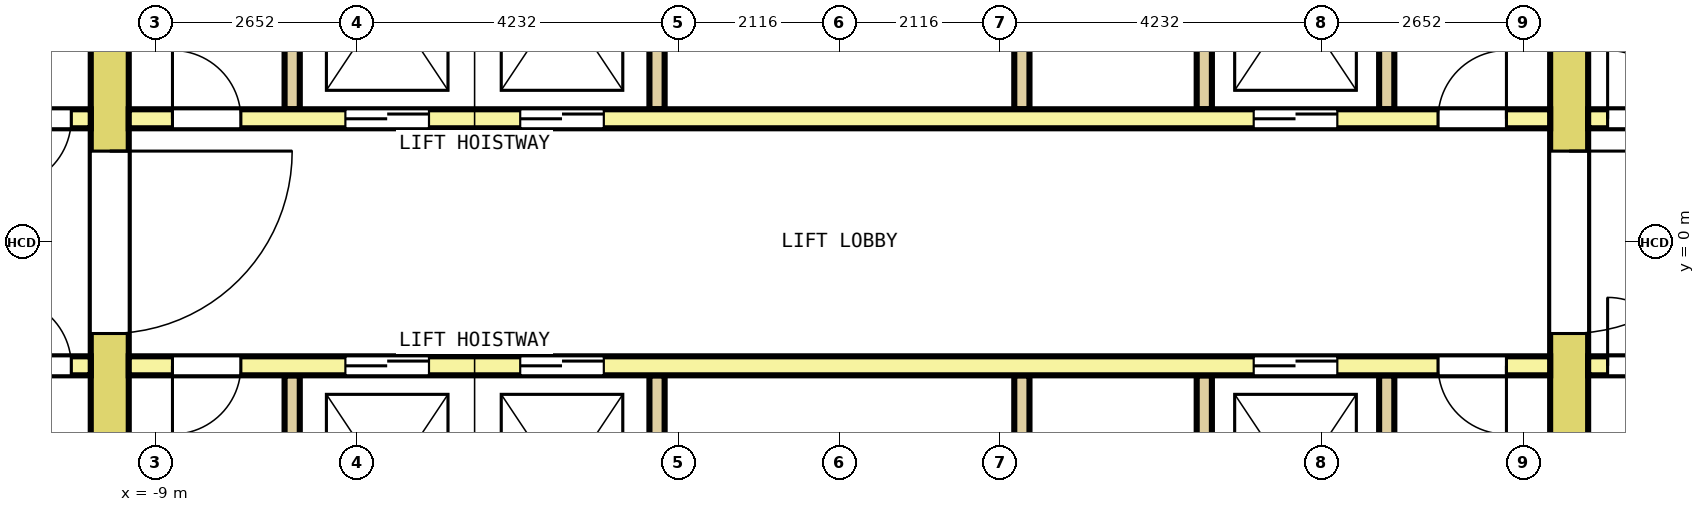
"""IFC4 building model, lengths in metres.
Left out: names, types, materials, properties, quantities, classifications, styles, units other than length and angle.
Written with IfcOpenShell. Run it as: python <this file> out.ifc"""

import sys

from ifc_helpers import new_model, si_unit, direction, frame, frame_2d, origin, place, context, subcontext, project, spatial, rectangle, extrude, element, fill, save


model = new_model("IFC4")
c1 = context("Model", 3, precision=1e-05, world=origin(), true_north=direction((0.0, 1.0)))
c2 = subcontext(c1, "Body", "Model", "MODEL_VIEW")
j1 = project(units=[si_unit("LENGTHUNIT", "METRE"), si_unit("PLANEANGLEUNIT", "RADIAN")], contexts=[c1])
p1 = place(None, origin())
s1 = spatial("IfcSite", under=j1, at=p1, CompositionType="ELEMENT")
p2 = place(p1, origin())
s2 = spatial("IfcBuilding", under=s1, at=p2, CompositionType="ELEMENT")
p3 = place(p2, frame((0.0, 0.0, 113.2)))
s3 = spatial("IfcBuildingStorey", under=s2, at=p3, CompositionType="ELEMENT", Elevation=113.2)
p4 = place(p3, frame((-9.6, -7.7, 0.0), z_axis=(0.0, 0.0, 1.0), x_axis=(0.0, 1.0, 0.0)))
e1 = element("IfcWall", 1, at=p4, inside=s3, PredefinedType="SHEAR", context=c2, shape_type="SweptSolid", body=[
    extrude(rectangle(XDim=15.4, YDim=0.5, at=frame_2d((7.7, 0.0))), origin(), (0.0, 0.0, 1.0), 4.1),
])
p5 = place(p4, frame((6.5, 0.0, 0.0)))
e2 = element("IfcOpeningElement", 2, at=p5, cuts=e1, PredefinedType="OPENING", context=c2, shape_type="SweptSolid", body=[
    extrude(rectangle(XDim=2.4, YDim=2.1, at=frame_2d((1.2, 1.05))), frame((0.0, 0.26, 0.0), z_axis=(0.0, -1.0, 0.0), x_axis=(1.0, 0.0, 0.0)), (0.0, 0.0, 1.0), 0.52),
])
p6 = place(p4, frame((13.4, 0.0, 0.0)))
e3 = element("IfcOpeningElement", 3, at=p6, cuts=e1, PredefinedType="OPENING", context=c2, shape_type="SweptSolid", body=[
    extrude(rectangle(XDim=1.2, YDim=2.1, at=frame_2d((0.6, 1.05))), frame((0.0, 0.26, 0.0), z_axis=(0.0, -1.0, 0.0), x_axis=(1.0, 0.0, 0.0)), (0.0, 0.0, 1.0), 0.52),
])
p7 = place(p4, frame((0.8, 0.0, 0.0)))
e4 = element("IfcOpeningElement", 4, at=p7, cuts=e1, PredefinedType="OPENING", context=c2, shape_type="SweptSolid", body=[
    extrude(rectangle(XDim=1.2, YDim=2.1, at=frame_2d((0.6, 1.05))), frame((0.0, 0.26, 0.0), z_axis=(0.0, -1.0, 0.0), x_axis=(1.0, 0.0, 0.0)), (0.0, 0.0, 1.0), 0.52),
])
p8 = place(p3, frame((9.6, -7.7, 0.0), z_axis=(0.0, 0.0, 1.0), x_axis=(0.0, 1.0, 0.0)))
e5 = element("IfcWall", 5, at=p8, inside=s3, PredefinedType="SHEAR", context=c2, shape_type="SweptSolid", body=[
    extrude(rectangle(XDim=15.4, YDim=0.5, at=frame_2d((7.7, 0.0))), origin(), (0.0, 0.0, 1.0), 4.1),
])
p9 = place(p8, frame((6.5, 0.0, 0.0)))
e6 = element("IfcOpeningElement", 6, at=p9, cuts=e5, PredefinedType="OPENING", context=c2, shape_type="SweptSolid", body=[
    extrude(rectangle(XDim=2.4, YDim=2.1, at=frame_2d((1.2, 1.05))), frame((0.0, 0.26, 0.0), z_axis=(0.0, -1.0, 0.0), x_axis=(1.0, 0.0, 0.0)), (0.0, 0.0, 1.0), 0.52),
])
p10 = place(p8, frame((13.4, 0.0, 0.0)))
e7 = element("IfcOpeningElement", 7, at=p10, cuts=e5, PredefinedType="OPENING", context=c2, shape_type="SweptSolid", body=[
    extrude(rectangle(XDim=1.2, YDim=2.1, at=frame_2d((0.6, 1.05))), frame((0.0, 0.26, 0.0), z_axis=(0.0, -1.0, 0.0), x_axis=(1.0, 0.0, 0.0)), (0.0, 0.0, 1.0), 0.52),
])
p11 = place(p8, frame((0.9, 0.0, 0.0)))
e8 = element("IfcOpeningElement", 8, at=p11, cuts=e5, PredefinedType="OPENING", context=c2, shape_type="SweptSolid", body=[
    extrude(rectangle(XDim=1.0, YDim=2.1, at=frame_2d((0.5, 1.05))), frame((0.0, 0.26, 0.0), z_axis=(0.0, -1.0, 0.0), x_axis=(1.0, 0.0, 0.0)), (0.0, 0.0, 1.0), 0.52),
])
p12 = place(p3, frame((-12.8, 1.625, 0.0), z_axis=(0.0, 0.0, 1.0), x_axis=(1.0, 0.0, 0.0)))
e9 = element("IfcWall", 9, at=p12, inside=s3, PredefinedType="SOLIDWALL", context=c2, shape_type="SweptSolid", body=[
    extrude(rectangle(XDim=2.95, YDim=0.25, at=frame_2d((1.475, 0.0))), origin(), (0.0, 0.0, 1.0), 4.1),
])
p13 = place(p12, frame((0.256, 0.0, 0.0)))
e10 = element("IfcOpeningElement", 10, at=p13, cuts=e9, PredefinedType="OPENING", context=c2, shape_type="SweptSolid", body=[
    extrude(rectangle(XDim=0.9, YDim=2.1, at=frame_2d((0.45, 1.05))), frame((0.0, 0.135, 0.0), z_axis=(0.0, -1.0, 0.0), x_axis=(1.0, 0.0, 0.0)), (0.0, 0.0, 1.0), 0.27),
])
p14 = place(p12, frame((1.794, 0.0, 0.0)))
e11 = element("IfcOpeningElement", 11, at=p14, cuts=e9, PredefinedType="OPENING", context=c2, shape_type="SweptSolid", body=[
    extrude(rectangle(XDim=0.9, YDim=2.1, at=frame_2d((0.45, 1.05))), frame((0.0, 0.135, 0.0), z_axis=(0.0, -1.0, 0.0), x_axis=(1.0, 0.0, 0.0)), (0.0, 0.0, 1.0), 0.27),
])
p15 = place(p3, frame((-9.35, 1.625, 0.0), z_axis=(0.0, 0.0, 1.0), x_axis=(1.0, 0.0, 0.0)))
e12 = element("IfcWall", 12, at=p15, inside=s3, PredefinedType="SOLIDWALL", context=c2, shape_type="SweptSolid", body=[
    extrude(rectangle(XDim=18.7, YDim=0.25, at=frame_2d((9.35, 0.0))), origin(), (0.0, 0.0, 1.0), 4.1),
])
p16 = place(p15, frame((2.85, 0.0, 0.0)))
e13 = element("IfcOpeningElement", 13, at=p16, cuts=e12, PredefinedType="OPENING", context=c2, shape_type="SweptSolid", body=[
    extrude(rectangle(XDim=1.1, YDim=2.1, at=frame_2d((0.55, 1.05))), frame((0.0, 0.135, 0.0), z_axis=(0.0, -1.0, 0.0), x_axis=(1.0, 0.0, 0.0)), (0.0, 0.0, 1.0), 0.27),
])
p17 = place(p15, frame((5.15, 0.0, 0.0)))
e14 = element("IfcOpeningElement", 14, at=p17, cuts=e12, PredefinedType="OPENING", context=c2, shape_type="SweptSolid", body=[
    extrude(rectangle(XDim=1.1, YDim=2.1, at=frame_2d((0.55, 1.05))), frame((0.0, 0.135, 0.0), z_axis=(0.0, -1.0, 0.0), x_axis=(1.0, 0.0, 0.0)), (0.0, 0.0, 1.0), 0.27),
])
p18 = place(p15, frame((14.8, 0.0, 0.0)))
e15 = element("IfcOpeningElement", 15, at=p18, cuts=e12, PredefinedType="OPENING", context=c2, shape_type="SweptSolid", body=[
    extrude(rectangle(XDim=1.1, YDim=2.1, at=frame_2d((0.55, 1.05))), frame((0.0, 0.135, 0.0), z_axis=(0.0, -1.0, 0.0), x_axis=(1.0, 0.0, 0.0)), (0.0, 0.0, 1.0), 0.27),
])
p19 = place(p15, frame((0.575, 0.0, 0.0)))
e16 = element("IfcOpeningElement", 16, at=p19, cuts=e12, PredefinedType="OPENING", context=c2, shape_type="SweptSolid", body=[
    extrude(rectangle(XDim=0.9, YDim=2.1, at=frame_2d((0.45, 1.05))), frame((0.0, 0.135, 0.0), z_axis=(0.0, -1.0, 0.0), x_axis=(1.0, 0.0, 0.0)), (0.0, 0.0, 1.0), 0.27),
])
p20 = place(p15, frame((17.225, 0.0, 0.0)))
e17 = element("IfcOpeningElement", 17, at=p20, cuts=e12, PredefinedType="OPENING", context=c2, shape_type="SweptSolid", body=[
    extrude(rectangle(XDim=0.9, YDim=2.1, at=frame_2d((0.45, 1.05))), frame((0.0, 0.135, 0.0), z_axis=(0.0, -1.0, 0.0), x_axis=(1.0, 0.0, 0.0)), (0.0, 0.0, 1.0), 0.27),
])
p21 = place(p3, frame((9.85, 1.625, 0.0), z_axis=(0.0, 0.0, 1.0), x_axis=(1.0, 0.0, 0.0)))
e18 = element("IfcWall", 18, at=p21, inside=s3, PredefinedType="SOLIDWALL", context=c2, shape_type="SweptSolid", body=[
    extrude(rectangle(XDim=2.95, YDim=0.25, at=frame_2d((1.475, 0.0))), origin(), (0.0, 0.0, 1.0), 4.1),
])
p22 = place(p21, frame((0.256, 0.0, 0.0)))
e19 = element("IfcOpeningElement", 19, at=p22, cuts=e18, PredefinedType="OPENING", context=c2, shape_type="SweptSolid", body=[
    extrude(rectangle(XDim=0.9, YDim=2.1, at=frame_2d((0.45, 1.05))), frame((0.0, 0.135, 0.0), z_axis=(0.0, -1.0, 0.0), x_axis=(1.0, 0.0, 0.0)), (0.0, 0.0, 1.0), 0.27),
])
p23 = place(p21, frame((1.794, 0.0, 0.0)))
e20 = element("IfcOpeningElement", 20, at=p23, cuts=e18, PredefinedType="OPENING", context=c2, shape_type="SweptSolid", body=[
    extrude(rectangle(XDim=0.9, YDim=2.1, at=frame_2d((0.45, 1.05))), frame((0.0, 0.135, 0.0), z_axis=(0.0, -1.0, 0.0), x_axis=(1.0, 0.0, 0.0)), (0.0, 0.0, 1.0), 0.27),
])
for number, where, z_axis, x_axis in (
    (21, (-7.2, 1.75, 0.0), (0.0, 0.0, 1.0), (0.0, 1.0, 0.0)),
    (22, (-2.4, 1.75, 0.0), (0.0, 0.0, 1.0), (0.0, 1.0, 0.0)),
    (23, (2.4, 1.75, 0.0), (0.0, 0.0, 1.0), (0.0, 1.0, 0.0)),
    (24, (4.8, 1.75, 0.0), (0.0, 0.0, 1.0), (0.0, 1.0, 0.0)),
    (25, (7.2, 1.75, 0.0), (0.0, 0.0, 1.0), (0.0, 1.0, 0.0)),
):
    element("IfcWall", number, at=place(p3, frame(where, z_axis=z_axis, x_axis=x_axis)), inside=s3, PredefinedType="SOLIDWALL", context=c2, shape_type="SweptSolid", body=[
        extrude(rectangle(XDim=2.9, YDim=0.2, at=frame_2d((1.45, 0.0))), origin(), (0.0, 0.0, 1.0), 4.1),
    ])
p24 = place(p3, frame((-12.8, -1.625, 0.0), z_axis=(0.0, 0.0, 1.0), x_axis=(1.0, 0.0, 0.0)))
e26 = element("IfcWall", 26, at=p24, inside=s3, PredefinedType="SOLIDWALL", context=c2, shape_type="SweptSolid", body=[
    extrude(rectangle(XDim=2.95, YDim=0.25, at=frame_2d((1.475, 0.0))), origin(), (0.0, 0.0, 1.0), 4.1),
])
p25 = place(p24, frame((0.256, 0.0, 0.0)))
e27 = element("IfcOpeningElement", 27, at=p25, cuts=e26, PredefinedType="OPENING", context=c2, shape_type="SweptSolid", body=[
    extrude(rectangle(XDim=0.9, YDim=2.1, at=frame_2d((0.45, 1.05))), frame((0.0, 0.135, 0.0), z_axis=(0.0, -1.0, 0.0), x_axis=(1.0, 0.0, 0.0)), (0.0, 0.0, 1.0), 0.27),
])
p26 = place(p24, frame((1.794, 0.0, 0.0)))
e28 = element("IfcOpeningElement", 28, at=p26, cuts=e26, PredefinedType="OPENING", context=c2, shape_type="SweptSolid", body=[
    extrude(rectangle(XDim=0.9, YDim=2.1, at=frame_2d((0.45, 1.05))), frame((0.0, 0.135, 0.0), z_axis=(0.0, -1.0, 0.0), x_axis=(1.0, 0.0, 0.0)), (0.0, 0.0, 1.0), 0.27),
])
p27 = place(p3, frame((-9.35, -1.625, 0.0), z_axis=(0.0, 0.0, 1.0), x_axis=(1.0, 0.0, 0.0)))
e29 = element("IfcWall", 29, at=p27, inside=s3, PredefinedType="SOLIDWALL", context=c2, shape_type="SweptSolid", body=[
    extrude(rectangle(XDim=18.7, YDim=0.25, at=frame_2d((9.35, 0.0))), origin(), (0.0, 0.0, 1.0), 4.1),
])
p28 = place(p27, frame((2.85, 0.0, 0.0)))
e30 = element("IfcOpeningElement", 30, at=p28, cuts=e29, PredefinedType="OPENING", context=c2, shape_type="SweptSolid", body=[
    extrude(rectangle(XDim=1.1, YDim=2.1, at=frame_2d((0.55, 1.05))), frame((0.0, 0.135, 0.0), z_axis=(0.0, -1.0, 0.0), x_axis=(1.0, 0.0, 0.0)), (0.0, 0.0, 1.0), 0.27),
])
p29 = place(p27, frame((5.15, 0.0, 0.0)))
e31 = element("IfcOpeningElement", 31, at=p29, cuts=e29, PredefinedType="OPENING", context=c2, shape_type="SweptSolid", body=[
    extrude(rectangle(XDim=1.1, YDim=2.1, at=frame_2d((0.55, 1.05))), frame((0.0, 0.135, 0.0), z_axis=(0.0, -1.0, 0.0), x_axis=(1.0, 0.0, 0.0)), (0.0, 0.0, 1.0), 0.27),
])
p30 = place(p27, frame((14.8, 0.0, 0.0)))
e32 = element("IfcOpeningElement", 32, at=p30, cuts=e29, PredefinedType="OPENING", context=c2, shape_type="SweptSolid", body=[
    extrude(rectangle(XDim=1.1, YDim=2.1, at=frame_2d((0.55, 1.05))), frame((0.0, 0.135, 0.0), z_axis=(0.0, -1.0, 0.0), x_axis=(1.0, 0.0, 0.0)), (0.0, 0.0, 1.0), 0.27),
])
p31 = place(p27, frame((0.575, 0.0, 0.0)))
e33 = element("IfcOpeningElement", 33, at=p31, cuts=e29, PredefinedType="OPENING", context=c2, shape_type="SweptSolid", body=[
    extrude(rectangle(XDim=0.9, YDim=2.1, at=frame_2d((0.45, 1.05))), frame((0.0, 0.135, 0.0), z_axis=(0.0, -1.0, 0.0), x_axis=(1.0, 0.0, 0.0)), (0.0, 0.0, 1.0), 0.27),
])
p32 = place(p27, frame((17.225, 0.0, 0.0)))
e34 = element("IfcOpeningElement", 34, at=p32, cuts=e29, PredefinedType="OPENING", context=c2, shape_type="SweptSolid", body=[
    extrude(rectangle(XDim=0.9, YDim=2.1, at=frame_2d((0.45, 1.05))), frame((0.0, 0.135, 0.0), z_axis=(0.0, -1.0, 0.0), x_axis=(1.0, 0.0, 0.0)), (0.0, 0.0, 1.0), 0.27),
])
p33 = place(p3, frame((9.85, -1.625, 0.0), z_axis=(0.0, 0.0, 1.0), x_axis=(1.0, 0.0, 0.0)))
e35 = element("IfcWall", 35, at=p33, inside=s3, PredefinedType="SOLIDWALL", context=c2, shape_type="SweptSolid", body=[
    extrude(rectangle(XDim=2.95, YDim=0.25, at=frame_2d((1.475, 0.0))), origin(), (0.0, 0.0, 1.0), 4.1),
])
p34 = place(p33, frame((0.256, 0.0, 0.0)))
e36 = element("IfcOpeningElement", 36, at=p34, cuts=e35, PredefinedType="OPENING", context=c2, shape_type="SweptSolid", body=[
    extrude(rectangle(XDim=0.9, YDim=2.1, at=frame_2d((0.45, 1.05))), frame((0.0, 0.135, 0.0), z_axis=(0.0, -1.0, 0.0), x_axis=(1.0, 0.0, 0.0)), (0.0, 0.0, 1.0), 0.27),
])
p35 = place(p33, frame((1.794, 0.0, 0.0)))
e37 = element("IfcOpeningElement", 37, at=p35, cuts=e35, PredefinedType="OPENING", context=c2, shape_type="SweptSolid", body=[
    extrude(rectangle(XDim=0.9, YDim=2.1, at=frame_2d((0.45, 1.05))), frame((0.0, 0.135, 0.0), z_axis=(0.0, -1.0, 0.0), x_axis=(1.0, 0.0, 0.0)), (0.0, 0.0, 1.0), 0.27),
])
for number, where, z_axis, x_axis in (
    (38, (-7.2, -4.65, 0.0), (0.0, 0.0, 1.0), (0.0, 1.0, 0.0)),
    (39, (-2.4, -4.65, 0.0), (0.0, 0.0, 1.0), (0.0, 1.0, 0.0)),
    (40, (2.4, -4.65, 0.0), (0.0, 0.0, 1.0), (0.0, 1.0, 0.0)),
    (41, (4.8, -4.65, 0.0), (0.0, 0.0, 1.0), (0.0, 1.0, 0.0)),
    (42, (7.2, -4.65, 0.0), (0.0, 0.0, 1.0), (0.0, 1.0, 0.0)),
):
    element("IfcWall", number, at=place(p3, frame(where, z_axis=z_axis, x_axis=x_axis)), inside=s3, PredefinedType="SOLIDWALL", context=c2, shape_type="SweptSolid", body=[
        extrude(rectangle(XDim=2.9, YDim=0.2, at=frame_2d((1.45, 0.0))), origin(), (0.0, 0.0, 1.0), 4.1),
    ])
p36 = place(p16, origin())
e43 = element("IfcDoor", 43, at=p36, inside=s3, OperationType="DOUBLE_DOOR_SLIDING", PredefinedType="DOOR", context=c2, shape_type="SweptSolid", body=[
    extrude(rectangle(XDim=1.1, YDim=2.1, at=frame_2d((0.55, 1.05))), frame((0.0, 0.075, 0.0), z_axis=(0.0, -1.0, 0.0), x_axis=(1.0, 0.0, 0.0)), (0.0, 0.0, 1.0), 0.15),
])
fill(e13, e43)
p37 = place(p17, origin())
e44 = element("IfcDoor", 44, at=p37, inside=s3, OperationType="DOUBLE_DOOR_SLIDING", PredefinedType="DOOR", context=c2, shape_type="SweptSolid", body=[
    extrude(rectangle(XDim=1.1, YDim=2.1, at=frame_2d((0.55, 1.05))), frame((0.0, 0.075, 0.0), z_axis=(0.0, -1.0, 0.0), x_axis=(1.0, 0.0, 0.0)), (0.0, 0.0, 1.0), 0.15),
])
fill(e14, e44)
p38 = place(p18, origin())
e45 = element("IfcDoor", 45, at=p38, inside=s3, OperationType="DOUBLE_DOOR_SLIDING", PredefinedType="DOOR", context=c2, shape_type="SweptSolid", body=[
    extrude(rectangle(XDim=1.1, YDim=2.1, at=frame_2d((0.55, 1.05))), frame((0.0, 0.075, 0.0), z_axis=(0.0, -1.0, 0.0), x_axis=(1.0, 0.0, 0.0)), (0.0, 0.0, 1.0), 0.15),
])
fill(e15, e45)
p39 = place(p28, origin())
e46 = element("IfcDoor", 46, at=p39, inside=s3, OperationType="DOUBLE_DOOR_SLIDING", PredefinedType="DOOR", context=c2, shape_type="SweptSolid", body=[
    extrude(rectangle(XDim=1.1, YDim=2.1, at=frame_2d((0.55, 1.05))), frame((0.0, 0.075, 0.0), z_axis=(0.0, -1.0, 0.0), x_axis=(1.0, 0.0, 0.0)), (0.0, 0.0, 1.0), 0.15),
])
fill(e30, e46)
p40 = place(p29, origin())
e47 = element("IfcDoor", 47, at=p40, inside=s3, OperationType="DOUBLE_DOOR_SLIDING", PredefinedType="DOOR", context=c2, shape_type="SweptSolid", body=[
    extrude(rectangle(XDim=1.1, YDim=2.1, at=frame_2d((0.55, 1.05))), frame((0.0, 0.075, 0.0), z_axis=(0.0, -1.0, 0.0), x_axis=(1.0, 0.0, 0.0)), (0.0, 0.0, 1.0), 0.15),
])
fill(e31, e47)
p41 = place(p30, origin())
e48 = element("IfcDoor", 48, at=p41, inside=s3, OperationType="DOUBLE_DOOR_SLIDING", PredefinedType="DOOR", context=c2, shape_type="SweptSolid", body=[
    extrude(rectangle(XDim=1.1, YDim=2.1, at=frame_2d((0.55, 1.05))), frame((0.0, 0.075, 0.0), z_axis=(0.0, -1.0, 0.0), x_axis=(1.0, 0.0, 0.0)), (0.0, 0.0, 1.0), 0.15),
])
fill(e32, e48)
p42 = place(p5, origin())
e49 = element("IfcDoor", 49, at=p42, inside=s3, OperationType="DOUBLE_DOOR_SINGLE_SWING", PredefinedType="DOOR", context=c2, shape_type="SweptSolid", body=[
    extrude(rectangle(XDim=2.4, YDim=2.1, at=frame_2d((1.2, 1.05))), frame((0.0, 0.2, 0.0), z_axis=(0.0, -1.0, 0.0), x_axis=(1.0, 0.0, 0.0)), (0.0, 0.0, 1.0), 0.4),
])
fill(e2, e49)
p43 = place(p9, origin())
e50 = element("IfcDoor", 50, at=p43, inside=s3, OperationType="DOUBLE_DOOR_SINGLE_SWING", PredefinedType="DOOR", context=c2, shape_type="SweptSolid", body=[
    extrude(rectangle(XDim=2.4, YDim=2.1, at=frame_2d((1.2, 1.05))), frame((0.0, 0.2, 0.0), z_axis=(0.0, -1.0, 0.0), x_axis=(1.0, 0.0, 0.0)), (0.0, 0.0, 1.0), 0.4),
])
fill(e6, e50)
p44 = place(p14, origin())
e51 = element("IfcDoor", 51, at=p44, inside=s3, OperationType="SINGLE_SWING_RIGHT", PredefinedType="DOOR", context=c2, shape_type="SweptSolid", body=[
    extrude(rectangle(XDim=0.9, YDim=2.1, at=frame_2d((0.45, 1.05))), frame((0.0, 0.075, 0.0), z_axis=(0.0, -1.0, 0.0), x_axis=(1.0, 0.0, 0.0)), (0.0, 0.0, 1.0), 0.15),
])
fill(e11, e51)
p45 = place(p19, origin())
e52 = element("IfcDoor", 52, at=p45, inside=s3, OperationType="SINGLE_SWING_LEFT", PredefinedType="DOOR", context=c2, shape_type="SweptSolid", body=[
    extrude(rectangle(XDim=0.9, YDim=2.1, at=frame_2d((0.45, 1.05))), frame((0.0, 0.075, 0.0), z_axis=(0.0, -1.0, 0.0), x_axis=(1.0, 0.0, 0.0)), (0.0, 0.0, 1.0), 0.15),
])
fill(e16, e52)
p46 = place(p20, origin())
e53 = element("IfcDoor", 53, at=p46, inside=s3, OperationType="SINGLE_SWING_RIGHT", PredefinedType="DOOR", context=c2, shape_type="SweptSolid", body=[
    extrude(rectangle(XDim=0.9, YDim=2.1, at=frame_2d((0.45, 1.05))), frame((0.0, 0.075, 0.0), z_axis=(0.0, -1.0, 0.0), x_axis=(1.0, 0.0, 0.0)), (0.0, 0.0, 1.0), 0.15),
])
fill(e17, e53)
p47 = place(p22, origin())
e54 = element("IfcDoor", 54, at=p47, inside=s3, OperationType="SINGLE_SWING_LEFT", PredefinedType="DOOR", context=c2, shape_type="SweptSolid", body=[
    extrude(rectangle(XDim=0.9, YDim=2.1, at=frame_2d((0.45, 1.05))), frame((0.0, 0.075, 0.0), z_axis=(0.0, -1.0, 0.0), x_axis=(1.0, 0.0, 0.0)), (0.0, 0.0, 1.0), 0.15),
])
fill(e19, e54)
p48 = place(p26, origin())
e55 = element("IfcDoor", 55, at=p48, inside=s3, OperationType="SINGLE_SWING_RIGHT", PredefinedType="DOOR", context=c2, shape_type="SweptSolid", body=[
    extrude(rectangle(XDim=0.9, YDim=2.1, at=frame_2d((0.45, 1.05))), frame((0.0, 0.075, 0.0), z_axis=(0.0, -1.0, 0.0), x_axis=(1.0, 0.0, 0.0)), (0.0, 0.0, 1.0), 0.15),
])
fill(e28, e55)
p49 = place(p31, origin())
e56 = element("IfcDoor", 56, at=p49, inside=s3, OperationType="SINGLE_SWING_LEFT", PredefinedType="DOOR", context=c2, shape_type="SweptSolid", body=[
    extrude(rectangle(XDim=0.9, YDim=2.1, at=frame_2d((0.45, 1.05))), frame((0.0, 0.075, 0.0), z_axis=(0.0, -1.0, 0.0), x_axis=(1.0, 0.0, 0.0)), (0.0, 0.0, 1.0), 0.15),
])
fill(e33, e56)
p50 = place(p32, origin())
e57 = element("IfcDoor", 57, at=p50, inside=s3, OperationType="SINGLE_SWING_RIGHT", PredefinedType="DOOR", context=c2, shape_type="SweptSolid", body=[
    extrude(rectangle(XDim=0.9, YDim=2.1, at=frame_2d((0.45, 1.05))), frame((0.0, 0.075, 0.0), z_axis=(0.0, -1.0, 0.0), x_axis=(1.0, 0.0, 0.0)), (0.0, 0.0, 1.0), 0.15),
])
fill(e34, e57)
p51 = place(p34, origin())
e58 = element("IfcDoor", 58, at=p51, inside=s3, OperationType="SINGLE_SWING_LEFT", PredefinedType="DOOR", context=c2, shape_type="SweptSolid", body=[
    extrude(rectangle(XDim=0.9, YDim=2.1, at=frame_2d((0.45, 1.05))), frame((0.0, 0.075, 0.0), z_axis=(0.0, -1.0, 0.0), x_axis=(1.0, 0.0, 0.0)), (0.0, 0.0, 1.0), 0.15),
])
fill(e36, e58)
save(model, sys.argv[1])
